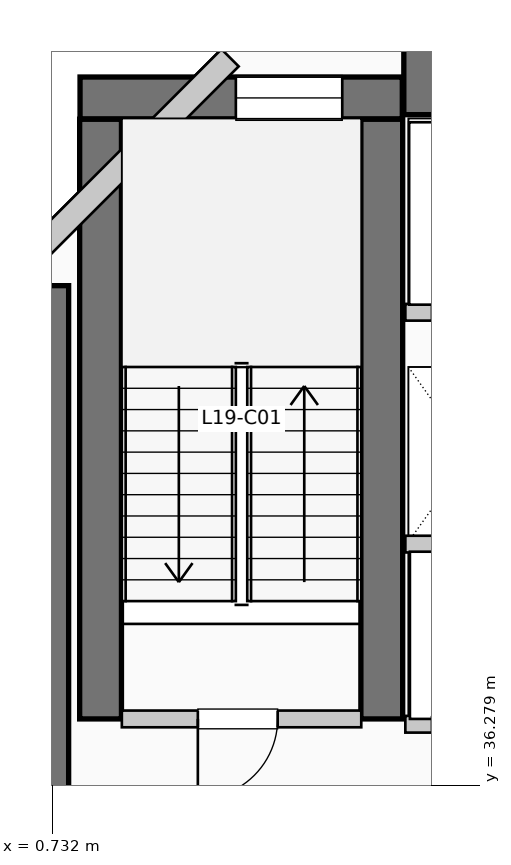
"""IFC4 building model, lengths in metres.
Left out: names, types, materials, properties, quantities, classifications, styles, units other than length and angle.
Written with IfcOpenShell. Run it as: python <this file> out.ifc"""

import sys

from ifc_helpers import new_model, si_unit, direction, frame, frame_2d, origin, place, context, subcontext, project, spatial, rectangle, extrude, element, fill, save


model = new_model("IFC4")
c1 = context("Model", 3, precision=1e-05, world=origin(), true_north=direction((0.0, 1.0)))
c2 = subcontext(c1, "Body", "Model", "MODEL_VIEW")
j1 = project(units=[si_unit("LENGTHUNIT", "METRE"), si_unit("PLANEANGLEUNIT", "RADIAN")], contexts=[c1])
p1 = place(None, origin())
s1 = spatial("IfcSite", under=j1, at=p1, CompositionType="ELEMENT")
p2 = place(p1, origin())
s2 = spatial("IfcBuilding", under=s1, at=p2, CompositionType="ELEMENT")
p3 = place(p2, frame((0.0, 0.0, 81.84)))
s3 = spatial("IfcBuildingStorey", under=s2, at=p3, CompositionType="ELEMENT", Elevation=81.84)
p4 = place(p3, frame((5.36, 45.55, 0.0), z_axis=(0.0, 0.0, 1.0), x_axis=(1.0, 0.0, 0.0)))
e1 = element("IfcWall", 1, at=p4, inside=s3, PredefinedType="SHEAR", context=c2, shape_type="SweptSolid", body=[
    extrude(rectangle(XDim=13.98, YDim=0.9, at=frame_2d((6.99, 0.0))), origin(), (0.0, 0.0, 1.0), 3.96),
])
p5 = place(p3, frame((0.5, 34.95, 0.0), z_axis=(0.0, 0.0, 1.0), x_axis=(0.0, 1.0, 0.0)))
e2 = element("IfcWall", 2, at=p5, inside=s3, PredefinedType="SHEAR", context=c2, shape_type="SweptSolid", body=[
    extrude(rectangle(XDim=7.9, YDim=0.9, at=frame_2d((3.95, 0.0))), origin(), (0.0, 0.0, 1.0), 3.96),
])
for number, where, z_axis, x_axis in (
    (3, (1.37, 37.15, 0.0), (0.0, 0.0, 1.0), (0.0, 1.0, 0.0)),
    (4, (5.07, 37.15, 0.0), (0.0, 0.0, 1.0), (0.0, 1.0, 0.0)),
):
    element("IfcWall", number, at=place(p3, frame(where, z_axis=z_axis, x_axis=x_axis)), inside=s3, PredefinedType="SHEAR", context=c2, shape_type="SweptSolid", body=[
        extrude(rectangle(XDim=7.89, YDim=0.55, at=frame_2d((3.945, 0.0))), origin(), (0.0, 0.0, 1.0), 3.96),
    ])
p6 = place(p3, frame((1.1, 45.32, 0.0), z_axis=(0.0, 0.0, 1.0), x_axis=(1.0, 0.0, 0.0)))
e5 = element("IfcWall", 5, at=p6, inside=s3, PredefinedType="SHEAR", context=c2, shape_type="SweptSolid", body=[
    extrude(rectangle(XDim=4.24, YDim=0.55, at=frame_2d((2.12, 0.0))), origin(), (0.0, 0.0, 1.0), 3.96),
])
p7 = place(p6, frame((2.05, 0.0, 1.05)))
e6 = element("IfcOpeningElement", 6, at=p7, cuts=e5, PredefinedType="OPENING", context=c2, shape_type="SweptSolid", body=[
    extrude(rectangle(XDim=1.4, YDim=1.8, at=frame_2d((0.7, 0.9))), frame((0.0, 0.285, 0.0), z_axis=(0.0, -1.0, 0.0), x_axis=(1.0, 0.0, 0.0)), (0.0, 0.0, 1.0), 0.57),
])
p8 = place(p3, frame((3.074, 45.848, 0.0), z_axis=(0.0, 0.0, 1.0), x_axis=(-0.707106781187, -0.707106781187, 0.0)))
e7 = element("IfcWall", 7, at=p8, inside=s3, PredefinedType="SOLIDWALL", context=c2, shape_type="SweptSolid", body=[
    extrude(rectangle(XDim=4.133, YDim=0.32, at=frame_2d((2.066, 0.0))), origin(), (0.0, 0.0, 1.0), 3.71),
])
p9 = place(p3, frame((1.65, 37.15, 0.0), z_axis=(0.0, 0.0, 1.0), x_axis=(1.0, 0.0, 0.0)))
e8 = element("IfcWall", 8, at=p9, inside=s3, PredefinedType="PARTITIONING", context=c2, shape_type="SweptSolid", body=[
    extrude(rectangle(XDim=3.15, YDim=0.22, at=frame_2d((1.575, 0.0))), origin(), (0.0, 0.0, 1.0), 3.71),
])
p10 = place(p9, frame((2.05, 0.0, 0.0), z_axis=(0.0, 0.0, 1.0), x_axis=(-1.0, 0.0, 0.0)))
e9 = element("IfcOpeningElement", 9, at=p10, cuts=e8, PredefinedType="OPENING", context=c2, shape_type="SweptSolid", body=[
    extrude(rectangle(XDim=1.05, YDim=2.15, at=frame_2d((0.525, 1.075))), frame((0.0, 0.12, 0.0), z_axis=(0.0, -1.0, 0.0), x_axis=(1.0, 0.0, 0.0)), (0.0, 0.0, 1.0), 0.24),
])
p11 = place(p3, frame((5.38, 37.08, 0.0), z_axis=(0.0, 0.0, 1.0), x_axis=(1.0, 0.0, 0.0)))
e10 = element("IfcWall", 10, at=p11, inside=s3, PredefinedType="PARTITIONING", context=c2, shape_type="SweptSolid", body=[
    extrude(rectangle(XDim=3.46, YDim=0.22, at=frame_2d((1.73, 0.0))), origin(), (0.0, 0.0, 1.0), 3.71),
])
p12 = place(p11, frame((1.55, 0.0, 0.0), z_axis=(0.0, 0.0, 1.0), x_axis=(-1.0, 0.0, 0.0)))
e11 = element("IfcOpeningElement", 11, at=p12, cuts=e10, PredefinedType="OPENING", context=c2, shape_type="SweptSolid", body=[
    extrude(rectangle(XDim=1.2, YDim=2.2, at=frame_2d((0.6, 1.1))), frame((0.0, 0.12, 0.0), z_axis=(0.0, -1.0, 0.0), x_axis=(1.0, 0.0, 0.0)), (0.0, 0.0, 1.0), 0.24),
])
p13 = place(p11, frame((3.22, 0.0, 0.0), z_axis=(0.0, 0.0, 1.0), x_axis=(-1.0, 0.0, 0.0)))
e12 = element("IfcOpeningElement", 12, at=p13, cuts=e10, PredefinedType="OPENING", context=c2, shape_type="SweptSolid", body=[
    extrude(rectangle(XDim=1.2, YDim=2.2, at=frame_2d((0.6, 1.1))), frame((0.0, 0.12, 0.0), z_axis=(0.0, -1.0, 0.0), x_axis=(1.0, 0.0, 0.0)), (0.0, 0.0, 1.0), 0.24),
])
p14 = place(p3, frame((5.38, 39.45, 0.0), z_axis=(0.0, 0.0, 1.0), x_axis=(1.0, 0.0, 0.0)))
e13 = element("IfcWall", 13, at=p14, inside=s3, PredefinedType="PARTITIONING", context=c2, shape_type="SweptSolid", body=[
    extrude(rectangle(XDim=3.46, YDim=0.22, at=frame_2d((1.73, 0.0))), origin(), (0.0, 0.0, 1.0), 3.71),
])
p15 = place(p3, frame((5.38, 42.5, 0.0), z_axis=(0.0, 0.0, 1.0), x_axis=(1.0, 0.0, 0.0)))
e14 = element("IfcWall", 14, at=p15, inside=s3, PredefinedType="PARTITIONING", context=c2, shape_type="SweptSolid", body=[
    extrude(rectangle(XDim=3.77, YDim=0.22, at=frame_2d((1.885, 0.0))), origin(), (0.0, 0.0, 1.0), 3.71),
])
p16 = place(p15, frame((1.75, 0.0, 0.0), z_axis=(0.0, 0.0, 1.0), x_axis=(-1.0, 0.0, 0.0)))
e15 = element("IfcOpeningElement", 15, at=p16, cuts=e14, PredefinedType="OPENING", context=c2, shape_type="SweptSolid", body=[
    extrude(rectangle(XDim=1.4, YDim=2.2, at=frame_2d((0.7, 1.1))), frame((0.0, 0.12, 0.0), z_axis=(0.0, -1.0, 0.0), x_axis=(1.0, 0.0, 0.0)), (0.0, 0.0, 1.0), 0.24),
])
p17 = place(p15, frame((3.53, 0.0, 0.0), z_axis=(0.0, 0.0, 1.0), x_axis=(-1.0, 0.0, 0.0)))
e16 = element("IfcOpeningElement", 16, at=p17, cuts=e14, PredefinedType="OPENING", context=c2, shape_type="SweptSolid", body=[
    extrude(rectangle(XDim=1.4, YDim=2.2, at=frame_2d((0.7, 1.1))), frame((0.0, 0.12, 0.0), z_axis=(0.0, -1.0, 0.0), x_axis=(1.0, 0.0, 0.0)), (0.0, 0.0, 1.0), 0.24),
])
p18 = place(p7, origin())
e17 = element("IfcWindow", 17, at=p18, inside=s3, PartitioningType="SINGLE_PANEL", PredefinedType="WINDOW", context=c2, shape_type="SweptSolid", body=[
    extrude(rectangle(XDim=1.4, YDim=1.8, at=frame_2d((0.7, 0.9))), frame((0.0, 0.03, 0.0), z_axis=(0.0, -1.0, 0.0), x_axis=(1.0, 0.0, 0.0)), (0.0, 0.0, 1.0), 0.06),
])
fill(e6, e17)
p19 = place(p10, origin())
e18 = element("IfcDoor", 18, at=p19, inside=s3, OperationType="SINGLE_SWING_LEFT", PredefinedType="DOOR", context=c2, shape_type="SweptSolid", body=[
    extrude(rectangle(XDim=1.05, YDim=2.15, at=frame_2d((0.525, 1.075))), frame((0.0, 0.025, 0.0), z_axis=(0.0, -1.0, 0.0), x_axis=(1.0, 0.0, 0.0)), (0.0, 0.0, 1.0), 0.05),
])
fill(e9, e18)
save(model, sys.argv[1])
